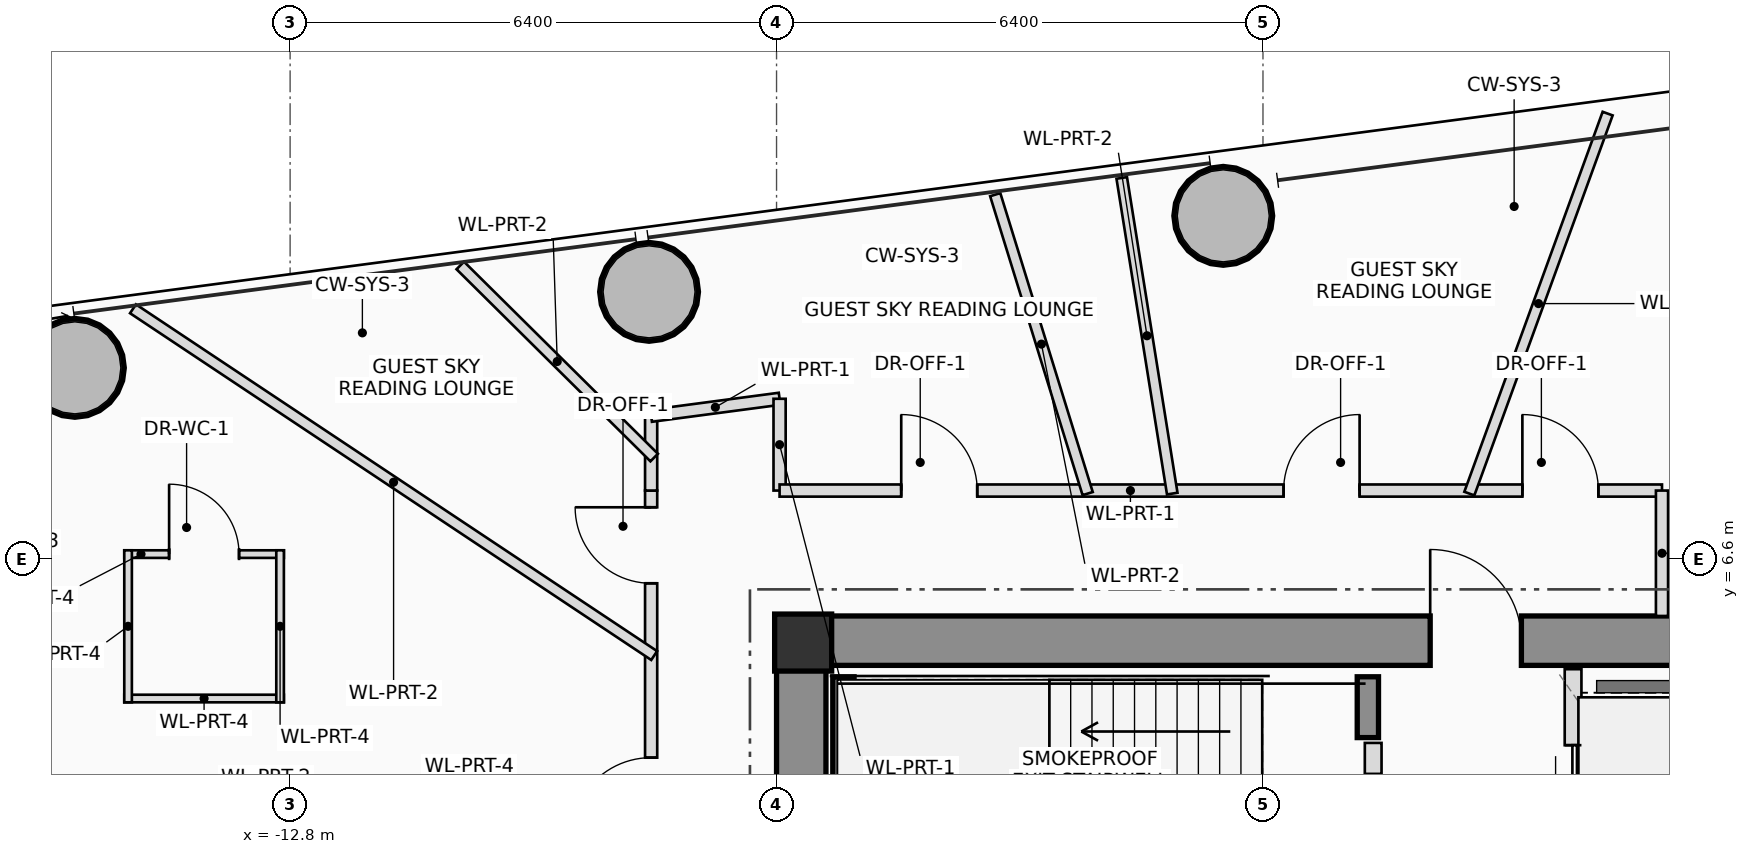
"""IFC4 building model, lengths in metres.
Left out: names, types, materials, properties, quantities, classifications, styles, units other than length and angle.
Written with IfcOpenShell. Run it as: python <this file> out.ifc"""

import sys

from ifc_helpers import new_model, si_unit, direction, frame, frame_2d, origin, origin_2d, place, context, subcontext, project, spatial, rectangle, hollow_circle, extrude, source, transform, mapped, element, fill, save


model = new_model("IFC4")
c1 = context("Model", 3, precision=1e-05, world=origin(), true_north=direction((0.0, 1.0)))
c2 = subcontext(c1, "Body", "Model", "MODEL_VIEW")
j1 = project(units=[si_unit("LENGTHUNIT", "METRE"), si_unit("PLANEANGLEUNIT", "RADIAN")], contexts=[c1])
p1 = place(None, origin())
s1 = spatial("IfcSite", under=j1, at=p1, CompositionType="ELEMENT")
p2 = place(p1, origin())
s2 = spatial("IfcBuilding", under=s1, at=p2, CompositionType="ELEMENT")
p3 = place(p2, frame((0.0, 0.0, 162.2)))
s3 = spatial("IfcBuildingStorey", under=s2, at=p3, CompositionType="ELEMENT", Elevation=162.2)
m1 = source(origin(), c2, "Body", "SweptSolid", [
    extrude(rectangle(XDim=0.75, YDim=0.75, at=origin_2d()), origin(), (0.0, 0.0, 1.0), 3.45),
])
p4 = place(p3, frame((-6.05, 5.5, 0.0), z_axis=(0.0, 0.0, 1.0), x_axis=(1.0, 0.0, 0.0)))
e1 = element("IfcColumn", 1, at=p4, inside=s3, PredefinedType="COLUMN", context=c2, shape_type="MappedRepresentation", body=[
    mapped(m1, transform((0.0, 0.0, 0.0), scale=1.0)),
])
p5 = place(p3, frame((-6.4, 5.525, 0.0), z_axis=(0.0, 0.0, 1.0), x_axis=(1.0, 0.0, 0.0)))
e2 = element("IfcWall", 2, at=p5, inside=s3, PredefinedType="SHEAR", context=c2, shape_type="SweptSolid", body=[
    extrude(rectangle(XDim=12.8, YDim=0.65, at=frame_2d((6.4, 0.0))), origin(), (0.0, 0.0, 1.0), 3.45),
])
p6 = place(p5, frame((8.6, 0.0, 0.0)))
e3 = element("IfcOpeningElement", 3, at=p6, cuts=e2, PredefinedType="OPENING", context=c2, shape_type="SweptSolid", body=[
    extrude(rectangle(XDim=1.2, YDim=2.2, at=frame_2d((0.6, 1.1))), frame((0.0, 0.335, 0.0), z_axis=(0.0, -1.0, 0.0), x_axis=(1.0, 0.0, 0.0)), (0.0, 0.0, 1.0), 0.67),
])
p7 = place(p3, frame((-6.075, 1.75, 0.0), z_axis=(0.0, 0.0, 1.0), x_axis=(0.0, 1.0, 0.0)))
e4 = element("IfcWall", 4, at=p7, inside=s3, PredefinedType="SHEAR", context=c2, shape_type="SweptSolid", body=[
    extrude(rectangle(XDim=3.45, YDim=0.65, at=frame_2d((1.725, 0.0))), origin(), (0.0, 0.0, 1.0), 3.45),
])
p8 = place(p3, frame((-5.52, 2.3, 0.0), z_axis=(0.0, 0.0, 1.0), x_axis=(0.0, 1.0, 0.0)))
e5 = element("IfcWall", 5, at=p8, inside=s3, PredefinedType="SHEAR", context=c2, shape_type="SweptSolid", body=[
    extrude(rectangle(XDim=2.75, YDim=0.28, at=frame_2d((1.375, 0.0))), origin(), (0.0, 0.0, 1.0), 3.45),
])
p9 = place(p3, frame((1.38, 4.25, 0.0), z_axis=(0.0, 0.0, 1.0), x_axis=(0.0, 1.0, 0.0)))
e6 = element("IfcWall", 6, at=p9, inside=s3, PredefinedType="SHEAR", context=c2, shape_type="SweptSolid", body=[
    extrude(rectangle(XDim=0.8, YDim=0.28, at=frame_2d((0.4, 0.0))), origin(), (0.0, 0.0, 1.0), 3.45),
])
m2 = source(origin(), c2, "Body", "SweptSolid", [
    extrude(hollow_circle(Radius=0.65, WallThickness=0.045, at=origin_2d()), origin(), (0.0, 0.0, 1.0), 3.45),
])
for number, where, z_axis, x_axis in (
    (7, (-0.522, 11.114, 0.0), (0.0, 0.0, 1.0), (1.0, 0.0, 0.0)),
    (8, (-8.077, 10.114, 0.0), (0.0, 0.0, 1.0), (1.0, 0.0, 0.0)),
    (9, (-15.632, 9.114, 0.0), (0.0, 0.0, 1.0), (1.0, 0.0, 0.0)),
):
    element("IfcColumn", number, at=place(p3, frame(where, z_axis=z_axis, x_axis=x_axis)), inside=s3, PredefinedType="COLUMN", context=c2, shape_type="MappedRepresentation", body=[
        mapped(m2, transform((0.0, 0.0, 0.0), scale=1.0)),
    ])
p10 = place(p3, frame((1.45, 2.2, 0.0), z_axis=(0.0, 0.0, 1.0), x_axis=(0.0, 1.0, 0.0)))
e10 = element("IfcWall", 10, at=p10, inside=s3, PredefinedType="PLUMBINGWALL", context=c2, shape_type="SweptSolid", body=[
    extrude(rectangle(XDim=1.98, YDim=0.22, at=frame_2d((0.99, 0.0))), origin(), (0.0, 0.0, 1.0), 3.25),
])
p11 = place(p10, frame((0.42, 0.0, 0.0)))
e11 = element("IfcOpeningElement", 11, at=p11, cuts=e10, PredefinedType="OPENING", context=c2, shape_type="SweptSolid", body=[
    extrude(rectangle(XDim=1.15, YDim=2.15, at=frame_2d((0.575, 1.075))), frame((0.0, 0.12, 0.0), z_axis=(0.0, -1.0, 0.0), x_axis=(1.0, 0.0, 0.0)), (0.0, 0.0, 1.0), 0.24),
])
p12 = place(p3, frame((4.08, 2.2, 0.0), z_axis=(0.0, 0.0, 1.0), x_axis=(0.0, 1.0, 0.0)))
e12 = element("IfcWall", 12, at=p12, inside=s3, PredefinedType="PLUMBINGWALL", context=c2, shape_type="SweptSolid", body=[
    extrude(rectangle(XDim=2.95, YDim=0.22, at=frame_2d((1.475, 0.0))), origin(), (0.0, 0.0, 1.0), 3.25),
])
p13 = place(p12, frame((0.75, 0.0, 0.0)))
e13 = element("IfcOpeningElement", 13, at=p13, cuts=e12, PredefinedType="OPENING", context=c2, shape_type="SweptSolid", body=[
    extrude(rectangle(XDim=1.2, YDim=2.25, at=frame_2d((0.6, 1.125))), frame((0.0, 0.12, 0.0), z_axis=(0.0, -1.0, 0.0), x_axis=(1.0, 0.0, 0.0)), (0.0, 0.0, 1.0), 0.24),
])
p14 = place(p3, frame((-14.982, 6.664, 0.0), z_axis=(0.0, 0.0, 1.0), x_axis=(1.0, 0.0, 0.0)))
e14 = element("IfcWall", 14, at=p14, inside=s3, PredefinedType="PARTITIONING", context=c2, shape_type="SweptSolid", body=[
    extrude(rectangle(XDim=2.1, YDim=0.1, at=frame_2d((1.05, 0.0))), origin(), (0.0, 0.0, 1.0), 2.905),
])
p15 = place(p14, frame((0.59, 0.0, 0.0)))
e15 = element("IfcOpeningElement", 15, at=p15, cuts=e14, PredefinedType="OPENING", context=c2, shape_type="SweptSolid", body=[
    extrude(rectangle(XDim=0.92, YDim=2.1, at=frame_2d((0.46, 1.05))), frame((0.0, 0.06, 0.0), z_axis=(0.0, -1.0, 0.0), x_axis=(1.0, 0.0, 0.0)), (0.0, 0.0, 1.0), 0.12),
])
p16 = place(p3, frame((-12.882, 4.764, 0.0), z_axis=(0.0, 0.0, 1.0), x_axis=(-1.0, 0.0, 0.0)))
e16 = element("IfcWall", 16, at=p16, inside=s3, PredefinedType="PARTITIONING", context=c2, shape_type="SweptSolid", body=[
    extrude(rectangle(XDim=2.1, YDim=0.1, at=frame_2d((1.05, 0.0))), origin(), (0.0, 0.0, 1.0), 2.605),
])
p17 = place(p3, frame((-12.932, 6.714, 0.0), z_axis=(0.0, 0.0, 1.0), x_axis=(0.0, -1.0, 0.0)))
e17 = element("IfcWall", 17, at=p17, inside=s3, PredefinedType="PARTITIONING", context=c2, shape_type="SweptSolid", body=[
    extrude(rectangle(XDim=2.0, YDim=0.1, at=frame_2d((1.0, 0.0))), origin(), (0.0, 0.0, 1.0), 2.605),
])
p18 = place(p3, frame((-14.932, 4.714, 0.0), z_axis=(0.0, 0.0, 1.0), x_axis=(0.0, 1.0, 0.0)))
e18 = element("IfcWall", 18, at=p18, inside=s3, PredefinedType="PARTITIONING", context=c2, shape_type="SweptSolid", body=[
    extrude(rectangle(XDim=2.0, YDim=0.1, at=frame_2d((1.0, 0.0))), origin(), (0.0, 0.0, 1.0), 3.25),
])
p19 = place(p3, frame((-8.05, -7.5, 0.0), z_axis=(0.0, 0.0, 1.0), x_axis=(0.0, 1.0, 0.0)))
e19 = element("IfcWall", 19, at=p19, inside=s3, PredefinedType="PARTITIONING", context=c2, shape_type="SweptSolid", body=[
    extrude(rectangle(XDim=15.0, YDim=0.16, at=frame_2d((7.5, 0.0))), origin(), (0.0, 0.0, 1.0), 2.605),
])
p20 = place(p19, frame((6.753, 0.0, 0.0)))
e20 = element("IfcOpeningElement", 20, at=p20, cuts=e19, PredefinedType="OPENING", context=c2, shape_type="SweptSolid", body=[
    extrude(rectangle(XDim=1.05, YDim=2.2, at=frame_2d((0.525, 1.1))), frame((0.0, 0.09, 0.0), z_axis=(0.0, -1.0, 0.0), x_axis=(1.0, 0.0, 0.0)), (0.0, 0.0, 1.0), 0.18),
])
p21 = place(p19, frame((10.436, 0.0, 0.0)))
e21 = element("IfcOpeningElement", 21, at=p21, cuts=e19, PredefinedType="OPENING", context=c2, shape_type="SweptSolid", body=[
    extrude(rectangle(XDim=1.05, YDim=2.2, at=frame_2d((0.525, 1.1))), frame((0.0, 0.09, 0.0), z_axis=(0.0, -1.0, 0.0), x_axis=(1.0, 0.0, 0.0)), (0.0, 0.0, 1.0), 0.18),
])
p22 = place(p19, frame((13.78, 0.0, 0.0)))
e22 = element("IfcOpeningElement", 22, at=p22, cuts=e19, PredefinedType="OPENING", context=c2, shape_type="SweptSolid", body=[
    extrude(rectangle(XDim=1.0, YDim=2.25, at=frame_2d((0.5, 1.125))), frame((0.0, 0.09, 0.0), z_axis=(0.0, -1.0, 0.0), x_axis=(1.0, 0.0, 0.0)), (0.0, 0.0, 1.0), 0.18),
])
p23 = place(p3, frame((-8.05, 7.5, 0.0), z_axis=(0.0, 0.0, 1.0), x_axis=(0.0, 1.0, 0.0)))
e23 = element("IfcWall", 23, at=p23, inside=s3, PredefinedType="PARTITIONING", context=c2, shape_type="SweptSolid", body=[
    extrude(rectangle(XDim=0.984, YDim=0.16, at=frame_2d((0.492, 0.0))), origin(), (0.0, 0.0, 1.0), 2.805),
])
p24 = place(p3, frame((-8.05, 8.484, 0.0), z_axis=(0.0, 0.0, 1.0), x_axis=(0.991338869543, 0.131328769629, 0.0)))
e24 = element("IfcWall", 24, at=p24, inside=s3, PredefinedType="PARTITIONING", context=c2, shape_type="SweptSolid", body=[
    extrude(rectangle(XDim=1.705, YDim=0.16, at=frame_2d((0.852, 0.0))), origin(), (0.0, 0.0, 1.0), 2.605),
])
p25 = place(p3, frame((-6.36, 8.708, 0.0), z_axis=(0.0, 0.0, 1.0), x_axis=(0.0, -1.0, 0.0)))
e25 = element("IfcWall", 25, at=p25, inside=s3, PredefinedType="PARTITIONING", context=c2, shape_type="SweptSolid", body=[
    extrude(rectangle(XDim=1.208, YDim=0.16, at=frame_2d((0.604, 0.0))), origin(), (0.0, 0.0, 1.0), 2.805),
])
p26 = place(p3, frame((-6.36, 7.5, 0.0), z_axis=(0.0, 0.0, 1.0), x_axis=(1.0, 0.0, 0.0)))
e26 = element("IfcWall", 26, at=p26, inside=s3, PredefinedType="PARTITIONING", context=c2, shape_type="SweptSolid", body=[
    extrude(rectangle(XDim=11.61, YDim=0.16, at=frame_2d((5.805, 0.0))), origin(), (0.0, 0.0, 1.0), 2.605),
])
p27 = place(p26, frame((1.6, 0.0, 0.0)))
e27 = element("IfcOpeningElement", 27, at=p27, cuts=e26, PredefinedType="OPENING", context=c2, shape_type="SweptSolid", body=[
    extrude(rectangle(XDim=1.0, YDim=2.25, at=frame_2d((0.5, 1.125))), frame((0.0, 0.09, 0.0), z_axis=(0.0, -1.0, 0.0), x_axis=(1.0, 0.0, 0.0)), (0.0, 0.0, 1.0), 0.18),
])
p28 = place(p26, frame((6.631, 0.0, 0.0)))
e28 = element("IfcOpeningElement", 28, at=p28, cuts=e26, PredefinedType="OPENING", context=c2, shape_type="SweptSolid", body=[
    extrude(rectangle(XDim=1.0, YDim=2.25, at=frame_2d((0.5, 1.125))), frame((0.0, 0.09, 0.0), z_axis=(0.0, -1.0, 0.0), x_axis=(1.0, 0.0, 0.0)), (0.0, 0.0, 1.0), 0.18),
])
p29 = place(p26, frame((9.773, 0.0, 0.0)))
e29 = element("IfcOpeningElement", 29, at=p29, cuts=e26, PredefinedType="OPENING", context=c2, shape_type="SweptSolid", body=[
    extrude(rectangle(XDim=1.0, YDim=2.25, at=frame_2d((0.5, 1.125))), frame((0.0, 0.09, 0.0), z_axis=(0.0, -1.0, 0.0), x_axis=(1.0, 0.0, 0.0)), (0.0, 0.0, 1.0), 0.18),
])
p30 = place(p3, frame((5.25, 7.5, 0.0), z_axis=(0.0, 0.0, 1.0), x_axis=(0.0, -1.0, 0.0)))
e30 = element("IfcWall", 30, at=p30, inside=s3, PredefinedType="PARTITIONING", context=c2, shape_type="SweptSolid", body=[
    extrude(rectangle(XDim=1.65, YDim=0.16, at=frame_2d((0.825, 0.0))), origin(), (0.0, 0.0, 1.0), 3.25),
])
p31 = place(p3, frame((2.715, 7.46, 0.0), z_axis=(0.0, 0.0, 1.0), x_axis=(0.342045165819, 0.939683512966, 0.0)))
e31 = element("IfcWall", 31, at=p31, inside=s3, PredefinedType="PARTITIONING", context=c2, shape_type="SweptSolid", body=[
    extrude(rectangle(XDim=5.32, YDim=0.14, at=frame_2d((2.66, 0.0))), origin(), (0.0, 0.0, 1.0), 2.605),
])
p32 = place(p3, frame((-1.194, 7.46, 0.0), z_axis=(0.0, 0.0, 1.0), x_axis=(-0.157995028697, 0.987439907492, 0.0)))
e32 = element("IfcWall", 32, at=p32, inside=s3, PredefinedType="PARTITIONING", context=c2, shape_type="SweptSolid", body=[
    extrude(rectangle(XDim=4.206, YDim=0.14, at=frame_2d((2.103, 0.0))), origin(), (0.0, 0.0, 1.0), 2.605),
])
p33 = place(p3, frame((-2.307, 7.46, 0.0), z_axis=(0.0, 0.0, 1.0), x_axis=(-0.295406664686, 0.955371604382, 0.0)))
e33 = element("IfcWall", 33, at=p33, inside=s3, PredefinedType="PARTITIONING", context=c2, shape_type="SweptSolid", body=[
    extrude(rectangle(XDim=4.117, YDim=0.14, at=frame_2d((2.058, 0.0))), origin(), (0.0, 0.0, 1.0), 2.605),
])
p34 = place(p3, frame((-8.01, 7.934, 0.0), z_axis=(0.0, 0.0, 1.0), x_axis=(-0.710464129117, 0.703733416315, 0.0)))
e34 = element("IfcWall", 34, at=p34, inside=s3, PredefinedType="PARTITIONING", context=c2, shape_type="SweptSolid", body=[
    extrude(rectangle(XDim=3.591, YDim=0.14, at=frame_2d((1.795, 0.0))), origin(), (0.0, 0.0, 1.0), 2.765),
])
p35 = place(p3, frame((-8.01, 5.329, 0.0), z_axis=(0.0, 0.0, 1.0), x_axis=(-0.832565256492, 0.553926975044, 0.0)))
e35 = element("IfcWall", 35, at=p35, inside=s3, PredefinedType="PARTITIONING", context=c2, shape_type="SweptSolid", body=[
    extrude(rectangle(XDim=8.236, YDim=0.14, at=frame_2d((4.118, 0.0))), origin(), (0.0, 0.0, 1.0), 2.605),
])
p36 = place(p6, origin())
e36 = element("IfcDoor", 36, at=p36, inside=s3, OperationType="SINGLE_SWING_LEFT", PredefinedType="DOOR", context=c2, shape_type="SweptSolid", body=[
    extrude(rectangle(XDim=1.2, YDim=2.2, at=frame_2d((0.6, 1.1))), frame((0.0, 0.025, 0.0), z_axis=(0.0, -1.0, 0.0), x_axis=(1.0, 0.0, 0.0)), (0.0, 0.0, 1.0), 0.05),
])
fill(e3, e36)
p37 = place(p11, origin())
e37 = element("IfcDoor", 37, at=p37, inside=s3, OperationType="SINGLE_SWING_LEFT", PredefinedType="DOOR", context=c2, shape_type="SweptSolid", body=[
    extrude(rectangle(XDim=1.15, YDim=2.15, at=frame_2d((0.575, 1.075))), frame((0.0, 0.025, 0.0), z_axis=(0.0, -1.0, 0.0), x_axis=(1.0, 0.0, 0.0)), (0.0, 0.0, 1.0), 0.05),
])
fill(e11, e37)
p38 = place(p13, origin())
e38 = element("IfcDoor", 38, at=p38, inside=s3, OperationType="DOUBLE_DOOR_SLIDING", PredefinedType="DOOR", context=c2, shape_type="SweptSolid", body=[
    extrude(rectangle(XDim=1.2, YDim=2.25, at=frame_2d((0.6, 1.125))), frame((0.0, 0.025, 0.0), z_axis=(0.0, -1.0, 0.0), x_axis=(1.0, 0.0, 0.0)), (0.0, 0.0, 1.0), 0.05),
])
fill(e13, e38)
p39 = place(p15, origin())
e39 = element("IfcDoor", 39, at=p39, inside=s3, OperationType="SINGLE_SWING_LEFT", PredefinedType="DOOR", context=c2, shape_type="SweptSolid", body=[
    extrude(rectangle(XDim=0.92, YDim=2.1, at=frame_2d((0.46, 1.05))), frame((0.0, 0.025, 0.0), z_axis=(0.0, -1.0, 0.0), x_axis=(1.0, 0.0, 0.0)), (0.0, 0.0, 1.0), 0.05),
])
fill(e15, e39)
p40 = place(p21, origin())
e40 = element("IfcDoor", 40, at=p40, inside=s3, OperationType="SINGLE_SWING_LEFT", PredefinedType="DOOR", context=c2, shape_type="SweptSolid", body=[
    extrude(rectangle(XDim=1.05, YDim=2.2, at=frame_2d((0.525, 1.1))), frame((0.0, 0.025, 0.0), z_axis=(0.0, -1.0, 0.0), x_axis=(1.0, 0.0, 0.0)), (0.0, 0.0, 1.0), 0.05),
])
fill(e21, e40)
p41 = place(p22, origin())
e41 = element("IfcDoor", 41, at=p41, inside=s3, OperationType="SINGLE_SWING_RIGHT", PredefinedType="DOOR", context=c2, shape_type="SweptSolid", body=[
    extrude(rectangle(XDim=1.0, YDim=2.25, at=frame_2d((0.5, 1.125))), frame((0.0, 0.025, 0.0), z_axis=(0.0, -1.0, 0.0), x_axis=(1.0, 0.0, 0.0)), (0.0, 0.0, 1.0), 0.05),
])
fill(e22, e41)
p42 = place(p27, origin())
e42 = element("IfcDoor", 42, at=p42, inside=s3, OperationType="SINGLE_SWING_LEFT", PredefinedType="DOOR", context=c2, shape_type="SweptSolid", body=[
    extrude(rectangle(XDim=1.0, YDim=2.25, at=frame_2d((0.5, 1.125))), frame((0.0, 0.025, 0.0), z_axis=(0.0, -1.0, 0.0), x_axis=(1.0, 0.0, 0.0)), (0.0, 0.0, 1.0), 0.05),
])
fill(e27, e42)
p43 = place(p28, origin())
e43 = element("IfcDoor", 43, at=p43, inside=s3, OperationType="SINGLE_SWING_RIGHT", PredefinedType="DOOR", context=c2, shape_type="SweptSolid", body=[
    extrude(rectangle(XDim=1.0, YDim=2.25, at=frame_2d((0.5, 1.125))), frame((0.0, 0.025, 0.0), z_axis=(0.0, -1.0, 0.0), x_axis=(1.0, 0.0, 0.0)), (0.0, 0.0, 1.0), 0.05),
])
fill(e28, e43)
p44 = place(p29, origin())
e44 = element("IfcDoor", 44, at=p44, inside=s3, OperationType="SINGLE_SWING_LEFT", PredefinedType="DOOR", context=c2, shape_type="SweptSolid", body=[
    extrude(rectangle(XDim=1.0, YDim=2.25, at=frame_2d((0.5, 1.125))), frame((0.0, 0.025, 0.0), z_axis=(0.0, -1.0, 0.0), x_axis=(1.0, 0.0, 0.0)), (0.0, 0.0, 1.0), 0.05),
])
fill(e29, e44)
save(model, sys.argv[1])
